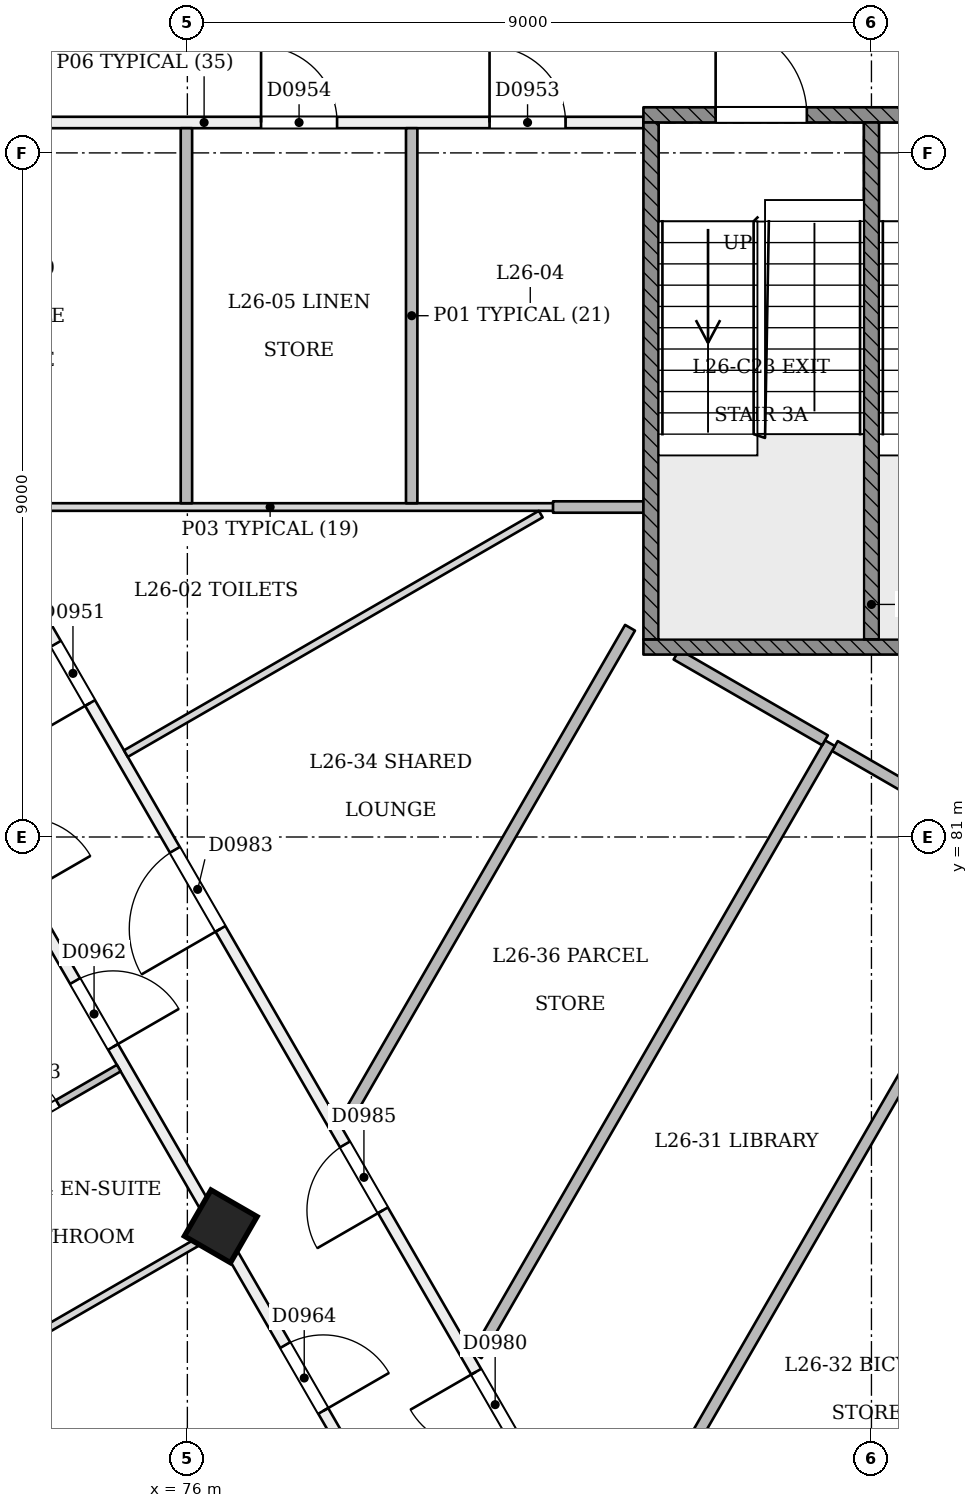
"""IFC4 building model, lengths in metres.
Left out: names, types, materials, properties, quantities, classifications, styles, units other than length and angle.
Written with IfcOpenShell. Run it as: python <this file> out.ifc"""

import sys

from ifc_helpers import new_model, si_unit, direction, frame, frame_2d, origin, origin_2d, place, context, subcontext, project, spatial, rectangle, extrude, element, fill, save


model = new_model("IFC4")
c1 = context("Model", 3, precision=1e-05, world=origin(), true_north=direction((0.0, 1.0)))
c2 = subcontext(c1, "Body", "Model", "MODEL_VIEW")
j1 = project(units=[si_unit("LENGTHUNIT", "METRE"), si_unit("PLANEANGLEUNIT", "RADIAN")], contexts=[c1])
p1 = place(None, origin())
s1 = spatial("IfcSite", under=j1, at=p1, CompositionType="ELEMENT")
p2 = place(p1, origin())
s2 = spatial("IfcBuilding", under=s1, at=p2, CompositionType="ELEMENT")
p3 = place(p2, frame((0.0, 0.0, 104.4)))
s3 = spatial("IfcBuildingStorey", under=s2, at=p3, CompositionType="ELEMENT", Elevation=104.4)
p4 = place(p3, frame((76.412, 75.831, -0.021), z_axis=(0.022221406801, 0.038413224561, 0.999014831351), x_axis=(-0.866021388936, -0.498527757451, 0.038432134412)))
e1 = element("IfcColumn", 1, at=p4, inside=s3, PredefinedType="COLUMN", context=c2, shape_type="SweptSolid", body=[
    extrude(rectangle(XDim=0.7, YDim=0.7, at=origin_2d()), origin(), (0.0, 0.0, 1.0), 3.604),
])
p5 = place(p3, frame((70.441, 90.4, 0.0), z_axis=(0.0, 0.0, 1.0), x_axis=(1.0, 0.0, 0.0)))
e2 = element("IfcWall", 2, at=p5, inside=s3, PredefinedType="PARTITIONING", context=c2, shape_type="SweptSolid", body=[
    extrude(rectangle(XDim=11.559, YDim=0.15, at=frame_2d((5.78, 0.0))), origin(), (0.0, 0.0, 1.0), 3.1),
])
p6 = place(p5, frame((9.535, 0.0, 0.0)))
e3 = element("IfcOpeningElement", 3, at=p6, cuts=e2, PredefinedType="OPENING", context=c2, shape_type="SweptSolid", body=[
    extrude(rectangle(XDim=1.0, YDim=2.1, at=frame_2d((0.5, 1.05))), frame((0.0, 0.085, 0.0), z_axis=(0.0, -1.0, 0.0), x_axis=(1.0, 0.0, 0.0)), (0.0, 0.0, 1.0), 0.171),
])
p7 = place(p5, frame((6.529, 0.0, 0.0)))
e4 = element("IfcOpeningElement", 4, at=p7, cuts=e2, PredefinedType="OPENING", context=c2, shape_type="SweptSolid", body=[
    extrude(rectangle(XDim=1.0, YDim=2.1, at=frame_2d((0.5, 1.05))), frame((0.0, 0.085, 0.0), z_axis=(0.0, -1.0, 0.0), x_axis=(1.0, 0.0, 0.0)), (0.0, 0.0, 1.0), 0.171),
])
p8 = place(p3, frame((63.745, 97.773, 0.0), z_axis=(0.0, 0.0, 1.0), x_axis=(0.500001045382, -0.866024800232, 0.0)))
e5 = element("IfcWall", 5, at=p8, inside=s3, PredefinedType="PARTITIONING", context=c2, shape_type="SweptSolid", body=[
    extrude(rectangle(XDim=41.671, YDim=0.15, at=frame_2d((20.836, 0.0))), origin(), (0.0, 0.0, 1.0), 2.7),
])
p9 = place(p8, frame((2.868, 0.0, 0.0)))
e6 = element("IfcOpeningElement", 6, at=p9, cuts=e5, PredefinedType="OPENING", context=c2, shape_type="SweptSolid", body=[
    extrude(rectangle(XDim=1.2, YDim=2.1, at=frame_2d((0.6, 1.05))), frame((0.0, 0.085, 0.0), z_axis=(0.0, -1.0, 0.0), x_axis=(1.0, 0.0, 0.0)), (0.0, 0.0, 1.0), 0.171),
])
p10 = place(p8, frame((10.115, 0.0, 0.0)))
e7 = element("IfcOpeningElement", 7, at=p10, cuts=e5, PredefinedType="OPENING", context=c2, shape_type="SweptSolid", body=[
    extrude(rectangle(XDim=1.0, YDim=2.1, at=frame_2d((0.5, 1.05))), frame((0.0, 0.085, 0.0), z_axis=(0.0, -1.0, 0.0), x_axis=(1.0, 0.0, 0.0)), (0.0, 0.0, 1.0), 0.171),
])
p11 = place(p8, frame((12.44, 0.0, 0.0)))
e8 = element("IfcOpeningElement", 8, at=p11, cuts=e5, PredefinedType="OPENING", context=c2, shape_type="SweptSolid", body=[
    extrude(rectangle(XDim=1.0, YDim=2.1, at=frame_2d((0.5, 1.05))), frame((0.0, 0.085, 0.0), z_axis=(0.0, -1.0, 0.0), x_axis=(1.0, 0.0, 0.0)), (0.0, 0.0, 1.0), 0.171),
])
p12 = place(p8, frame((19.231, 0.0, 0.0)))
e9 = element("IfcOpeningElement", 9, at=p12, cuts=e5, PredefinedType="OPENING", context=c2, shape_type="SweptSolid", body=[
    extrude(rectangle(XDim=1.0, YDim=2.1, at=frame_2d((0.5, 1.05))), frame((0.0, 0.085, 0.0), z_axis=(0.0, -1.0, 0.0), x_axis=(1.0, 0.0, 0.0)), (0.0, 0.0, 1.0), 0.171),
])
p13 = place(p8, frame((21.556, 0.0, 0.0)))
e10 = element("IfcOpeningElement", 10, at=p13, cuts=e5, PredefinedType="OPENING", context=c2, shape_type="SweptSolid", body=[
    extrude(rectangle(XDim=1.0, YDim=2.1, at=frame_2d((0.5, 1.05))), frame((0.0, 0.085, 0.0), z_axis=(0.0, -1.0, 0.0), x_axis=(1.0, 0.0, 0.0)), (0.0, 0.0, 1.0), 0.171),
])
p14 = place(p8, frame((27.086, 0.0, 0.0)))
e11 = element("IfcOpeningElement", 11, at=p14, cuts=e5, PredefinedType="OPENING", context=c2, shape_type="SweptSolid", body=[
    extrude(rectangle(XDim=1.0, YDim=2.1, at=frame_2d((0.5, 1.05))), frame((0.0, 0.085, 0.0), z_axis=(0.0, -1.0, 0.0), x_axis=(1.0, 0.0, 0.0)), (0.0, 0.0, 1.0), 0.171),
])
p15 = place(p8, frame((30.44, 0.0, 0.0)))
e12 = element("IfcOpeningElement", 12, at=p15, cuts=e5, PredefinedType="OPENING", context=c2, shape_type="SweptSolid", body=[
    extrude(rectangle(XDim=1.0, YDim=2.1, at=frame_2d((0.5, 1.05))), frame((0.0, 0.085, 0.0), z_axis=(0.0, -1.0, 0.0), x_axis=(1.0, 0.0, 0.0)), (0.0, 0.0, 1.0), 0.171),
])
p16 = place(p8, frame((37.619, 0.0, 0.0)))
e13 = element("IfcOpeningElement", 13, at=p16, cuts=e5, PredefinedType="OPENING", context=c2, shape_type="SweptSolid", body=[
    extrude(rectangle(XDim=1.2, YDim=2.1, at=frame_2d((0.6, 1.05))), frame((0.0, 0.085, 0.0), z_axis=(0.0, -1.0, 0.0), x_axis=(1.0, 0.0, 0.0)), (0.0, 0.0, 1.0), 0.171),
])
p17 = place(p3, frame((99.689, 90.4, 0.0), z_axis=(0.0, 0.0, 1.0), x_axis=(-0.500002079822, -0.866024202995, 0.0)))
e14 = element("IfcWall", 14, at=p17, inside=s3, PredefinedType="PARTITIONING", context=c2, shape_type="SweptSolid", body=[
    extrude(rectangle(XDim=29.249, YDim=0.15, at=frame_2d((14.624, 0.0))), origin(), (0.0, 0.0, 1.0), 3.1),
])
p18 = place(p17, frame((18.65, 0.0, 0.0)))
e15 = element("IfcOpeningElement", 15, at=p18, cuts=e14, PredefinedType="OPENING", context=c2, shape_type="SweptSolid", body=[
    extrude(rectangle(XDim=0.9, YDim=2.1, at=frame_2d((0.45, 1.05))), frame((0.0, 0.085, 0.0), z_axis=(0.0, -1.0, 0.0), x_axis=(1.0, 0.0, 0.0)), (0.0, 0.0, 1.0), 0.171),
])
p19 = place(p17, frame((13.969, 0.0, 0.0)))
e16 = element("IfcOpeningElement", 16, at=p19, cuts=e14, PredefinedType="OPENING", context=c2, shape_type="SweptSolid", body=[
    extrude(rectangle(XDim=1.0, YDim=2.1, at=frame_2d((0.5, 1.05))), frame((0.0, 0.085, 0.0), z_axis=(0.0, -1.0, 0.0), x_axis=(1.0, 0.0, 0.0)), (0.0, 0.0, 1.0), 0.171),
])
p20 = place(p17, frame((4.249, 0.0, 0.0)))
e17 = element("IfcOpeningElement", 17, at=p20, cuts=e14, PredefinedType="OPENING", context=c2, shape_type="SweptSolid", body=[
    extrude(rectangle(XDim=1.0, YDim=2.1, at=frame_2d((0.5, 1.05))), frame((0.0, 0.085, 0.0), z_axis=(0.0, -1.0, 0.0), x_axis=(1.0, 0.0, 0.0)), (0.0, 0.0, 1.0), 0.171),
])
p21 = place(p17, frame((9.987, 0.0, 0.0)))
e18 = element("IfcOpeningElement", 18, at=p21, cuts=e14, PredefinedType="OPENING", context=c2, shape_type="SweptSolid", body=[
    extrude(rectangle(XDim=1.0, YDim=2.1, at=frame_2d((0.5, 1.05))), frame((0.0, 0.085, 0.0), z_axis=(0.0, -1.0, 0.0), x_axis=(1.0, 0.0, 0.0)), (0.0, 0.0, 1.0), 0.171),
])
p22 = place(p3, frame((85.0, 64.958, 0.0), z_axis=(0.0, 0.0, 1.0), x_axis=(-0.500001082908, 0.866024778566, 0.0)))
e19 = element("IfcWall", 19, at=p22, inside=s3, PredefinedType="PARTITIONING", context=c2, shape_type="SweptSolid", body=[
    extrude(rectangle(XDim=29.378, YDim=0.15, at=frame_2d((14.689, 0.0))), origin(), (0.0, 0.0, 1.0), 3.1),
])
p23 = place(p22, frame((20.56, 0.0, 0.0)))
e20 = element("IfcOpeningElement", 20, at=p23, cuts=e19, PredefinedType="OPENING", context=c2, shape_type="SweptSolid", body=[
    extrude(rectangle(XDim=0.9, YDim=2.1, at=frame_2d((0.45, 1.05))), frame((0.0, 0.085, 0.0), z_axis=(0.0, -1.0, 0.0), x_axis=(1.0, 0.0, 0.0)), (0.0, 0.0, 1.0), 0.171),
])
p24 = place(p22, frame((9.401, 0.0, 0.0)))
e21 = element("IfcOpeningElement", 21, at=p24, cuts=e19, PredefinedType="OPENING", context=c2, shape_type="SweptSolid", body=[
    extrude(rectangle(XDim=1.0, YDim=2.1, at=frame_2d((0.5, 1.05))), frame((0.0, 0.085, 0.0), z_axis=(0.0, -1.0, 0.0), x_axis=(1.0, 0.0, 0.0)), (0.0, 0.0, 1.0), 0.171),
])
p25 = place(p22, frame((5.849, 0.0, 0.0)))
e22 = element("IfcOpeningElement", 22, at=p25, cuts=e19, PredefinedType="OPENING", context=c2, shape_type="SweptSolid", body=[
    extrude(rectangle(XDim=1.0, YDim=2.1, at=frame_2d((0.5, 1.05))), frame((0.0, 0.085, 0.0), z_axis=(0.0, -1.0, 0.0), x_axis=(1.0, 0.0, 0.0)), (0.0, 0.0, 1.0), 0.171),
])
p26 = place(p22, frame((17.129, 0.0, 0.0)))
e23 = element("IfcOpeningElement", 23, at=p26, cuts=e19, PredefinedType="OPENING", context=c2, shape_type="SweptSolid", body=[
    extrude(rectangle(XDim=1.2, YDim=2.1, at=frame_2d((0.6, 1.05))), frame((0.0, 0.085, 0.0), z_axis=(0.0, -1.0, 0.0), x_axis=(1.0, 0.0, 0.0)), (0.0, 0.0, 1.0), 0.171),
])
p27 = place(p22, frame((12.854, 0.0, 0.0)))
e24 = element("IfcOpeningElement", 24, at=p27, cuts=e19, PredefinedType="OPENING", context=c2, shape_type="SweptSolid", body=[
    extrude(rectangle(XDim=1.0, YDim=2.1, at=frame_2d((0.5, 1.05))), frame((0.0, 0.085, 0.0), z_axis=(0.0, -1.0, 0.0), x_axis=(1.0, 0.0, 0.0)), (0.0, 0.0, 1.0), 0.171),
])
p28 = place(p22, frame((2.32, 0.0, 0.0)))
e25 = element("IfcOpeningElement", 25, at=p28, cuts=e19, PredefinedType="OPENING", context=c2, shape_type="SweptSolid", body=[
    extrude(rectangle(XDim=1.0, YDim=2.1, at=frame_2d((0.5, 1.05))), frame((0.0, 0.085, 0.0), z_axis=(0.0, -1.0, 0.0), x_axis=(1.0, 0.0, 0.0)), (0.0, 0.0, 1.0), 0.171),
])
p29 = place(p22, frame((25.198, 0.0, 0.0)))
e26 = element("IfcOpeningElement", 26, at=p29, cuts=e19, PredefinedType="OPENING", context=c2, shape_type="SweptSolid", body=[
    extrude(rectangle(XDim=1.0, YDim=2.1, at=frame_2d((0.5, 1.05))), frame((0.0, 0.085, 0.0), z_axis=(0.0, -1.0, 0.0), x_axis=(1.0, 0.0, 0.0)), (0.0, 0.0, 1.0), 0.171),
])
p30 = place(p3, frame((80.831, 85.341, 0.0), z_axis=(0.0, 0.0, 1.0), x_axis=(-1.0, 0.0, 0.0)))
e27 = element("IfcWall", 27, at=p30, inside=s3, PredefinedType="PARTITIONING", context=c2, shape_type="SweptSolid", body=[
    extrude(rectangle(XDim=7.484, YDim=0.1, at=frame_2d((3.742, 0.0))), origin(), (0.0, 0.0, 1.0), 3.1),
])
p31 = place(p3, frame((75.191, 82.097, 0.0), z_axis=(0.0, 0.0, 1.0), x_axis=(0.866029473454, 0.499992951059, 0.0)))
e28 = element("IfcWall", 28, at=p31, inside=s3, PredefinedType="PARTITIONING", context=c2, shape_type="SweptSolid", body=[
    extrude(rectangle(XDim=6.302, YDim=0.1, at=frame_2d((3.151, 0.0))), origin(), (0.0, 0.0, 1.0), 3.1),
])
p32 = place(p3, frame((78.951, 90.325, 0.0), z_axis=(0.0, 0.0, 1.0), x_axis=(0.0, -1.0, 0.0)))
e29 = element("IfcWall", 29, at=p32, inside=s3, PredefinedType="PARTITIONING", context=c2, shape_type="SweptSolid", body=[
    extrude(rectangle(XDim=4.934, YDim=0.15, at=frame_2d((2.467, 0.0))), origin(), (0.0, 0.0, 1.0), 3.1),
])
p33 = place(p3, frame((80.811, 85.341, 0.0), z_axis=(0.0, 0.0, 1.0), x_axis=(1.0, 0.0, 0.0)))
e30 = element("IfcWall", 30, at=p33, inside=s3, PredefinedType="PARTITIONING", context=c2, shape_type="SweptSolid", body=[
    extrude(rectangle(XDim=1.189, YDim=0.15, at=frame_2d((0.595, 0.0))), origin(), (0.0, 0.0, 1.0), 3.1),
])
p34 = place(p3, frame((75.988, 90.325, 0.0), z_axis=(0.0, 0.0, 1.0), x_axis=(0.0, -1.0, 0.0)))
e31 = element("IfcWall", 31, at=p34, inside=s3, PredefinedType="PARTITIONING", context=c2, shape_type="SweptSolid", body=[
    extrude(rectangle(XDim=4.934, YDim=0.15, at=frame_2d((2.467, 0.0))), origin(), (0.0, 0.0, 1.0), 3.1),
])
p35 = place(p3, frame((72.651, 76.547, 0.0), z_axis=(0.0, 0.0, 1.0), x_axis=(0.866011447264, 0.500024172624, 0.0)))
e32 = element("IfcWall", 32, at=p35, inside=s3, PredefinedType="PARTITIONING", context=c2, shape_type="SweptSolid", body=[
    extrude(rectangle(XDim=2.825, YDim=0.1, at=frame_2d((1.413, 0.0))), origin(), (0.0, 0.0, 1.0), 3.1),
])
p36 = place(p35, frame((1.0, 0.0, 0.0)))
e33 = element("IfcOpeningElement", 33, at=p36, cuts=e32, PredefinedType="OPENING", context=c2, shape_type="SweptSolid", body=[
    extrude(rectangle(XDim=0.9, YDim=2.1, at=frame_2d((0.45, 1.05))), frame((0.0, 0.061, 0.0), z_axis=(0.0, -1.0, 0.0), x_axis=(1.0, 0.0, 0.0)), (0.0, 0.0, 1.0), 0.121),
])
p37 = place(p3, frame((73.918, 74.392, 0.0), z_axis=(0.0, 0.0, 1.0), x_axis=(0.866011654119, 0.500023814363, 0.0)))
e34 = element("IfcWall", 34, at=p37, inside=s3, PredefinedType="PARTITIONING", context=c2, shape_type="SweptSolid", body=[
    extrude(rectangle(XDim=2.805, YDim=0.1, at=frame_2d((1.402, 0.0))), origin(), (0.0, 0.0, 1.0), 2.7),
])
p38 = place(p3, frame((81.558, 71.145, 0.0), z_axis=(0.0, 0.0, 1.0), x_axis=(0.499991429629, 0.866030351834, 0.0)))
e35 = element("IfcWall", 35, at=p38, inside=s3, PredefinedType="PARTITIONING", context=c2, shape_type="SweptSolid", body=[
    extrude(rectangle(XDim=22.104, YDim=0.15, at=frame_2d((11.052, 0.0))), origin(), (0.0, 0.0, 1.0), 3.1),
])
p39 = place(p3, frame((87.019, 80.754, 0.0), z_axis=(0.0, 0.0, 1.0), x_axis=(-0.866027848477, 0.499995765644, 0.0)))
e36 = element("IfcWall", 36, at=p39, inside=s3, PredefinedType="PARTITIONING", context=c2, shape_type="SweptSolid", body=[
    extrude(rectangle(XDim=2.887, YDim=0.15, at=frame_2d((1.443, 0.0))), origin(), (0.0, 0.0, 1.0), 3.1),
])
p40 = place(p3, frame((84.454, 82.234, 0.0), z_axis=(0.0, 0.0, 1.0), x_axis=(-0.500001996123, -0.866024251319, 0.0)))
e37 = element("IfcWall", 37, at=p40, inside=s3, PredefinedType="PARTITIONING", context=c2, shape_type="SweptSolid", body=[
    extrude(rectangle(XDim=9.299, YDim=0.15, at=frame_2d((4.649, 0.0))), origin(), (0.0, 0.0, 1.0), 3.1),
])
p41 = place(p3, frame((83.311, 68.108, 0.0), z_axis=(0.0, 0.0, 1.0), x_axis=(0.499992838882, 0.866029538218, 0.0)))
e38 = element("IfcWall", 38, at=p41, inside=s3, PredefinedType="PARTITIONING", context=c2, shape_type="SweptSolid", body=[
    extrude(rectangle(XDim=5.914, YDim=0.15, at=frame_2d((2.957, 0.0))), origin(), (0.0, 0.0, 1.0), 3.1),
])
p42 = place(p3, frame((82.435, 83.4, 0.0), z_axis=(0.0, 0.0, 1.0), x_axis=(0.866050434864, -0.499956642393, 0.0)))
e39 = element("IfcWall", 39, at=p42, inside=s3, PredefinedType="PARTITIONING", context=c2, shape_type="SweptSolid", body=[
    extrude(rectangle(XDim=2.256, YDim=0.15, at=frame_2d((1.128, 0.0))), origin(), (0.0, 0.0, 1.0), 3.1),
])
p43 = place(p3, frame((78.051, 77.218, 0.0), z_axis=(0.0, 0.0, 1.0), x_axis=(0.500015595758, 0.866016399382, 0.0)))
e40 = element("IfcWall", 40, at=p43, inside=s3, PredefinedType="PARTITIONING", context=c2, shape_type="SweptSolid", body=[
    extrude(rectangle(XDim=7.546, YDim=0.15, at=frame_2d((3.773, 0.0))), origin(), (0.0, 0.0, 1.0), 3.1),
])
p44 = place(p3, frame((82.0, 90.5, 0.0), z_axis=(0.0, 0.0, 1.0), x_axis=(1.0, 0.0, 0.0)))
e41 = element("IfcWall", 41, at=p44, inside=s3, PredefinedType="SOLIDWALL", context=c2, shape_type="SweptSolid", body=[
    extrude(rectangle(XDim=6.0, YDim=0.2, at=frame_2d((3.0, 0.0))), origin(), (0.0, 0.0, 1.0), 3.1),
])
p45 = place(p44, frame((0.95, 0.0, 0.0)))
e42 = element("IfcOpeningElement", 42, at=p45, cuts=e41, PredefinedType="OPENING", context=c2, shape_type="SweptSolid", body=[
    extrude(rectangle(XDim=1.2, YDim=2.1, at=frame_2d((0.6, 1.05))), frame((0.0, 0.11, 0.0), z_axis=(0.0, -1.0, 0.0), x_axis=(1.0, 0.0, 0.0)), (0.0, 0.0, 1.0), 0.221),
])
p46 = place(p44, frame((3.85, 0.0, 0.0)))
e43 = element("IfcOpeningElement", 43, at=p46, cuts=e41, PredefinedType="OPENING", context=c2, shape_type="SweptSolid", body=[
    extrude(rectangle(XDim=1.2, YDim=2.1, at=frame_2d((0.6, 1.05))), frame((0.0, 0.11, 0.0), z_axis=(0.0, -1.0, 0.0), x_axis=(1.0, 0.0, 0.0)), (0.0, 0.0, 1.0), 0.221),
])
p47 = place(p3, frame((82.0, 83.5, 0.0), z_axis=(0.0, 0.0, 1.0), x_axis=(1.0, 0.0, 0.0)))
e44 = element("IfcWall", 44, at=p47, inside=s3, PredefinedType="SOLIDWALL", context=c2, shape_type="SweptSolid", body=[
    extrude(rectangle(XDim=6.0, YDim=0.2, at=frame_2d((3.0, 0.0))), origin(), (0.0, 0.0, 1.0), 3.1),
])
for number, where, z_axis, x_axis in (
    (45, (82.1, 83.6, 0.0), (0.0, 0.0, 1.0), (0.0, 1.0, 0.0)),
    (46, (85.0, 83.6, 0.0), (0.0, 0.0, 1.0), (0.0, 1.0, 0.0)),
):
    element("IfcWall", number, at=place(p3, frame(where, z_axis=z_axis, x_axis=x_axis)), inside=s3, PredefinedType="SOLIDWALL", context=c2, shape_type="SweptSolid", body=[
        extrude(rectangle(XDim=6.8, YDim=0.2, at=frame_2d((3.4, 0.0))), origin(), (0.0, 0.0, 1.0), 3.1),
    ])
p48 = place(p23, origin())
e47 = element("IfcDoor", 47, at=p48, inside=s3, OperationType="SINGLE_SWING_LEFT", PredefinedType="NOTDEFINED", context=c2, shape_type="SweptSolid", body=[
    extrude(rectangle(XDim=0.9, YDim=2.1, at=frame_2d((0.45, 1.05))), frame((0.0, 0.025, 0.0), z_axis=(0.0, -1.0, 0.0), x_axis=(1.0, 0.0, 0.0)), (0.0, 0.0, 1.0), 0.05),
])
fill(e20, e47)
p49 = place(p6, origin())
e48 = element("IfcDoor", 48, at=p49, inside=s3, OperationType="SINGLE_SWING_LEFT", PredefinedType="NOTDEFINED", context=c2, shape_type="SweptSolid", body=[
    extrude(rectangle(XDim=1.0, YDim=2.1, at=frame_2d((0.5, 1.05))), frame((0.0, 0.025, 0.0), z_axis=(0.0, -1.0, 0.0), x_axis=(1.0, 0.0, 0.0)), (0.0, 0.0, 1.0), 0.05),
])
fill(e3, e48)
p50 = place(p7, origin())
e49 = element("IfcDoor", 49, at=p50, inside=s3, OperationType="SINGLE_SWING_LEFT", PredefinedType="NOTDEFINED", context=c2, shape_type="SweptSolid", body=[
    extrude(rectangle(XDim=1.0, YDim=2.1, at=frame_2d((0.5, 1.05))), frame((0.0, 0.025, 0.0), z_axis=(0.0, -1.0, 0.0), x_axis=(1.0, 0.0, 0.0)), (0.0, 0.0, 1.0), 0.05),
])
fill(e4, e49)
p51 = place(p13, origin())
e50 = element("IfcDoor", 50, at=p51, inside=s3, OperationType="SINGLE_SWING_RIGHT", PredefinedType="NOTDEFINED", context=c2, shape_type="SweptSolid", body=[
    extrude(rectangle(XDim=1.0, YDim=2.1, at=frame_2d((0.5, 1.05))), frame((0.0, 0.025, 0.0), z_axis=(0.0, -1.0, 0.0), x_axis=(1.0, 0.0, 0.0)), (0.0, 0.0, 1.0), 0.05),
])
fill(e10, e50)
p52 = place(p36, origin())
e51 = element("IfcDoor", 51, at=p52, inside=s3, OperationType="SINGLE_SWING_LEFT", PredefinedType="NOTDEFINED", context=c2, shape_type="SweptSolid", body=[
    extrude(rectangle(XDim=0.9, YDim=2.1, at=frame_2d((0.45, 1.05))), frame((0.0, 0.025, 0.0), z_axis=(0.0, -1.0, 0.0), x_axis=(1.0, 0.0, 0.0)), (0.0, 0.0, 1.0), 0.05),
])
fill(e33, e51)
p53 = place(p14, origin())
e52 = element("IfcDoor", 52, at=p53, inside=s3, OperationType="SINGLE_SWING_RIGHT", PredefinedType="NOTDEFINED", context=c2, shape_type="SweptSolid", body=[
    extrude(rectangle(XDim=1.0, YDim=2.1, at=frame_2d((0.5, 1.05))), frame((0.0, 0.025, 0.0), z_axis=(0.0, -1.0, 0.0), x_axis=(1.0, 0.0, 0.0)), (0.0, 0.0, 1.0), 0.05),
])
fill(e11, e52)
p54 = place(p24, origin())
e53 = element("IfcDoor", 53, at=p54, inside=s3, OperationType="SINGLE_SWING_RIGHT", PredefinedType="NOTDEFINED", context=c2, shape_type="SweptSolid", body=[
    extrude(rectangle(XDim=1.0, YDim=2.1, at=frame_2d((0.5, 1.05))), frame((0.0, 0.025, 0.0), z_axis=(0.0, -1.0, 0.0), x_axis=(1.0, 0.0, 0.0)), (0.0, 0.0, 1.0), 0.05),
])
fill(e21, e53)
p55 = place(p26, origin())
e54 = element("IfcDoor", 54, at=p55, inside=s3, OperationType="SINGLE_SWING_LEFT", PredefinedType="NOTDEFINED", context=c2, shape_type="SweptSolid", body=[
    extrude(rectangle(XDim=1.2, YDim=2.1, at=frame_2d((0.6, 1.05))), frame((0.0, 0.025, 0.0), z_axis=(0.0, -1.0, 0.0), x_axis=(1.0, 0.0, 0.0)), (0.0, 0.0, 1.0), 0.05),
])
fill(e23, e54)
p56 = place(p27, origin())
e55 = element("IfcDoor", 55, at=p56, inside=s3, OperationType="SINGLE_SWING_LEFT", PredefinedType="NOTDEFINED", context=c2, shape_type="SweptSolid", body=[
    extrude(rectangle(XDim=1.0, YDim=2.1, at=frame_2d((0.5, 1.05))), frame((0.0, 0.025, 0.0), z_axis=(0.0, -1.0, 0.0), x_axis=(1.0, 0.0, 0.0)), (0.0, 0.0, 1.0), 0.05),
])
fill(e24, e55)
p57 = place(p45, origin())
e56 = element("IfcDoor", 56, at=p57, inside=s3, OperationType="SINGLE_SWING_LEFT", PredefinedType="NOTDEFINED", context=c2, shape_type="SweptSolid", body=[
    extrude(rectangle(XDim=1.2, YDim=2.1, at=frame_2d((0.6, 1.05))), frame((0.0, 0.025, 0.0), z_axis=(0.0, -1.0, 0.0), x_axis=(1.0, 0.0, 0.0)), (0.0, 0.0, 1.0), 0.05),
])
fill(e42, e56)
save(model, sys.argv[1])
